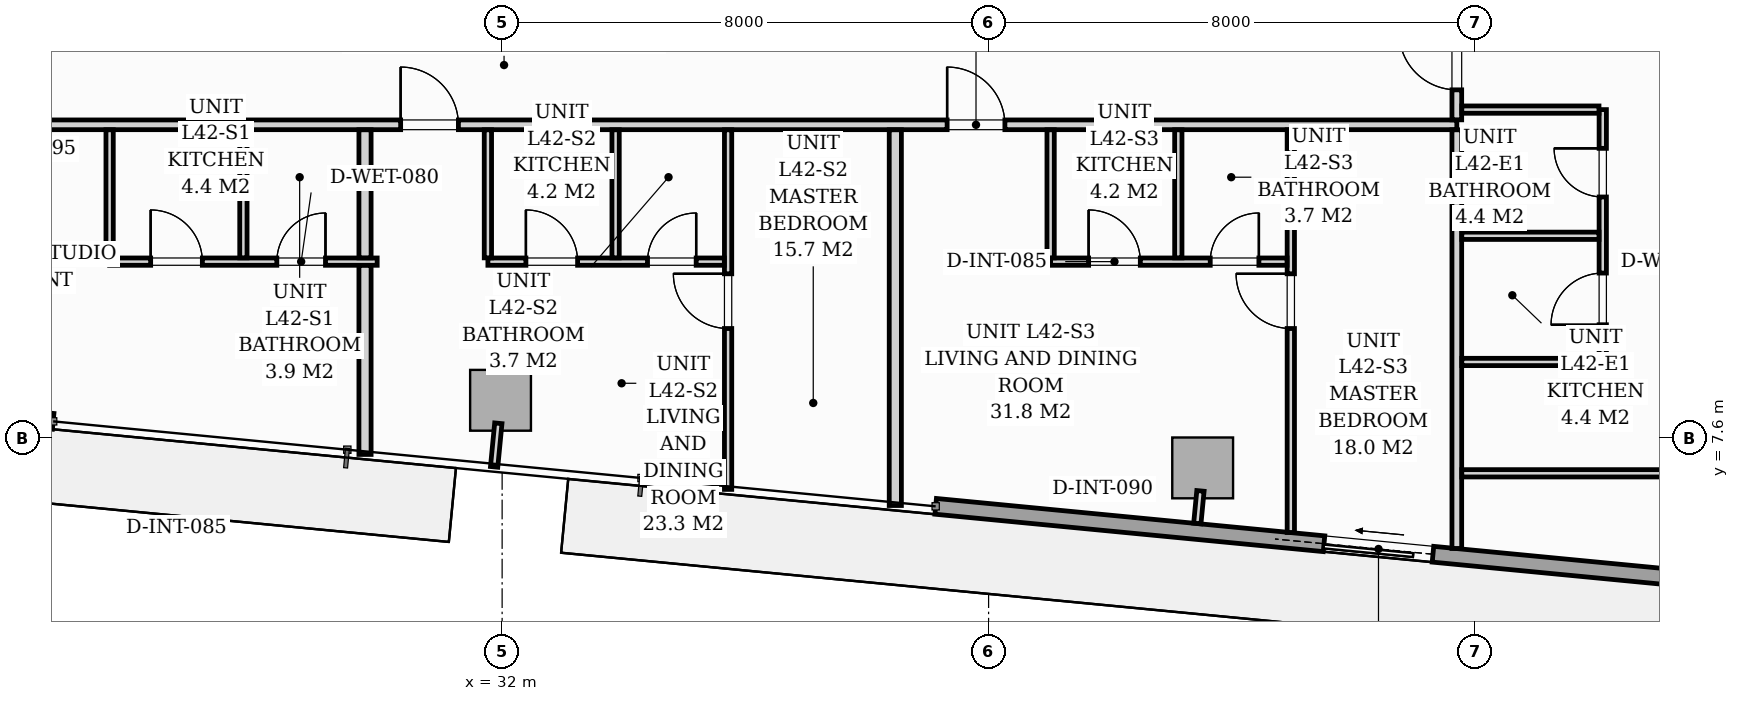
"""IFC4 building model, lengths in metres.
Left out: names, types, materials, properties, quantities, classifications, styles, units other than length and angle.
Written with IfcOpenShell. Run it as: python <this file> out.ifc"""

import sys

from ifc_helpers import new_model, si_unit, direction, frame, frame_2d, origin, origin_2d, place, context, subcontext, project, spatial, rectangle, extrude, source, transform, mapped, element, fill, save


model = new_model("IFC4")
c1 = context("Model", 3, precision=1e-05, world=origin(), true_north=direction((0.0, 1.0)))
c2 = subcontext(c1, "Body", "Model", "MODEL_VIEW")
j1 = project(units=[si_unit("LENGTHUNIT", "METRE"), si_unit("PLANEANGLEUNIT", "RADIAN")], contexts=[c1])
p1 = place(None, origin())
s1 = spatial("IfcSite", under=j1, at=p1, CompositionType="ELEMENT")
p2 = place(p1, origin())
s2 = spatial("IfcBuilding", under=s1, at=p2, CompositionType="ELEMENT")
p3 = place(p2, frame((0.0, 0.0, 147.0)))
s3 = spatial("IfcBuildingStorey", under=s2, at=p3, CompositionType="ELEMENT", Elevation=147.0)
m1 = source(origin(), c2, "Body", "SweptSolid", [
    extrude(rectangle(XDim=1.0, YDim=1.0, at=origin_2d()), origin(), (0.0, 0.0, 1.0), 3.196),
])
for number, where, z_axis, x_axis in (
    (1, (31.974, 8.22, 0.002), (0.0, 0.0, 1.0), (0.995, -0.096, 0.0)),
    (2, (43.521, 7.108, 0.002), (0.0, 0.0, 1.0), (0.995, -0.096, 0.0)),
):
    element("IfcColumn", number, at=place(p3, frame(where, z_axis=z_axis, x_axis=x_axis)), inside=s3, PredefinedType="COLUMN", context=c2, shape_type="MappedRepresentation", body=[
        mapped(m1, transform((0.0, 0.0, 0.0), scale=1.0)),
    ])
p4 = place(p3, frame((56.061, 4.845, 0.0), z_axis=(0.0, 0.0, 1.0), x_axis=(-0.995395976631, 0.095848055311, 0.0)))
e3 = element("IfcWall", 3, at=p4, inside=s3, PredefinedType="STANDARD", context=c2, shape_type="SweptSolid", body=[
    extrude(rectangle(XDim=17.01, YDim=0.26, at=frame_2d((8.505, 0.0))), origin(), (0.0, 0.0, 1.0), 2.94),
])
p5 = place(p4, frame((8.794, 0.0, 0.0)))
e4 = element("IfcOpeningElement", 4, at=p5, cuts=e3, PredefinedType="OPENING", context=c2, shape_type="SweptSolid", body=[
    extrude(rectangle(XDim=1.8, YDim=2.06, at=frame_2d((0.9, 1.03))), frame((0.0, 0.14, 0.0), z_axis=(0.0, -1.0, 0.0), x_axis=(1.0, 0.0, 0.0)), (0.0, 0.0, 1.0), 0.28),
])
p6 = place(p4, frame((2.05, 0.0, 0.65)))
e5 = element("IfcOpeningElement", 5, at=p6, cuts=e3, PredefinedType="OPENING", context=c2, shape_type="SweptSolid", body=[
    extrude(rectangle(XDim=1.6, YDim=1.5, at=frame_2d((0.8, 0.75))), frame((0.0, 0.14, 0.0), z_axis=(0.0, -1.0, 0.0), x_axis=(1.0, 0.0, 0.0)), (0.0, 0.0, 1.0), 0.28),
])
p7 = place(p3, frame((24.617, 7.873, 0.0), z_axis=(0.0, 0.0, 1.0), x_axis=(-0.995395976631, 0.095848055311, 0.0)))
e6 = element("IfcWall", 6, at=p7, inside=s3, PredefinedType="STANDARD", context=c2, shape_type="SweptSolid", body=[
    extrude(rectangle(XDim=17.01, YDim=0.26, at=frame_2d((8.505, 0.0))), origin(), (0.0, 0.0, 1.0), 2.94),
])
p8 = place(p7, frame((6.79, 0.0, 0.0)))
e7 = element("IfcOpeningElement", 7, at=p8, cuts=e6, PredefinedType="OPENING", context=c2, shape_type="SweptSolid", body=[
    extrude(rectangle(XDim=1.8, YDim=2.06, at=frame_2d((0.9, 1.03))), frame((0.0, 0.14, 0.0), z_axis=(0.0, -1.0, 0.0), x_axis=(1.0, 0.0, 0.0)), (0.0, 0.0, 1.0), 0.28),
])
p9 = place(p7, frame((9.25, 0.0, 0.65)))
e8 = element("IfcOpeningElement", 8, at=p9, cuts=e6, PredefinedType="OPENING", context=c2, shape_type="SweptSolid", body=[
    extrude(rectangle(XDim=1.6, YDim=1.5, at=frame_2d((0.8, 0.75))), frame((0.0, 0.14, 0.0), z_axis=(0.0, -1.0, 0.0), x_axis=(1.0, 0.0, 0.0)), (0.0, 0.0, 1.0), 0.28),
])
p10 = place(p3, frame((22.05, 12.75, 0.0), z_axis=(0.0, 0.0, 1.0), x_axis=(1.0, 0.0, 0.0)))
e9 = element("IfcWall", 9, at=p10, inside=s3, PredefinedType="PARTITIONING", context=c2, shape_type="SweptSolid", body=[
    extrude(rectangle(XDim=25.65, YDim=0.16, at=frame_2d((12.825, 0.0))), origin(), (0.0, 0.0, 1.0), 2.94),
])
p11 = place(p10, frame((1.312, 0.0, 0.0)))
e10 = element("IfcOpeningElement", 10, at=p11, cuts=e9, PredefinedType="OPENING", context=c2, shape_type="SweptSolid", body=[
    extrude(rectangle(XDim=0.95, YDim=2.06, at=frame_2d((0.475, 1.03))), frame((0.0, 0.09, 0.0), z_axis=(0.0, -1.0, 0.0), x_axis=(1.0, 0.0, 0.0)), (0.0, 0.0, 1.0), 0.18),
])
p12 = place(p10, frame((8.281, 0.0, 0.0)))
e11 = element("IfcOpeningElement", 11, at=p12, cuts=e9, PredefinedType="OPENING", context=c2, shape_type="SweptSolid", body=[
    extrude(rectangle(XDim=0.95, YDim=2.06, at=frame_2d((0.475, 1.03))), frame((0.0, 0.09, 0.0), z_axis=(0.0, -1.0, 0.0), x_axis=(1.0, 0.0, 0.0)), (0.0, 0.0, 1.0), 0.18),
])
p13 = place(p10, frame((17.268, 0.0, 0.0)))
e12 = element("IfcOpeningElement", 12, at=p13, cuts=e9, PredefinedType="OPENING", context=c2, shape_type="SweptSolid", body=[
    extrude(rectangle(XDim=0.95, YDim=2.06, at=frame_2d((0.475, 1.03))), frame((0.0, 0.09, 0.0), z_axis=(0.0, -1.0, 0.0), x_axis=(1.0, 0.0, 0.0)), (0.0, 0.0, 1.0), 0.18),
])
p14 = place(p3, frame((47.7, 5.783, 0.0), z_axis=(0.0, 0.0, 1.0), x_axis=(0.0, 1.0, 0.0)))
e13 = element("IfcWall", 13, at=p14, inside=s3, PredefinedType="PARTITIONING", context=c2, shape_type="SweptSolid", body=[
    extrude(rectangle(XDim=6.885, YDim=0.16, at=frame_2d((3.442, 0.0))), origin(), (0.0, 0.0, 1.0), 2.94),
])
p15 = place(p3, frame((47.7, 12.832, 0.0), z_axis=(0.0, 0.0, 1.0), x_axis=(0.0, 1.0, 0.0)))
e14 = element("IfcWall", 14, at=p15, inside=s3, PredefinedType="PARTITIONING", context=c2, shape_type="SweptSolid", body=[
    extrude(rectangle(XDim=7.818, YDim=0.16, at=frame_2d((3.909, 0.0))), origin(), (0.0, 0.0, 1.0), 2.94),
])
p16 = place(p15, frame((0.493, 0.0, 0.0)))
e15 = element("IfcOpeningElement", 15, at=p16, cuts=e14, PredefinedType="OPENING", context=c2, shape_type="SweptSolid", body=[
    extrude(rectangle(XDim=0.95, YDim=2.06, at=frame_2d((0.475, 1.03))), frame((0.0, 0.09, 0.0), z_axis=(0.0, -1.0, 0.0), x_axis=(1.0, 0.0, 0.0)), (0.0, 0.0, 1.0), 0.18),
])
p17 = place(p15, frame((5.313, 0.0, 0.0)))
e16 = element("IfcOpeningElement", 16, at=p17, cuts=e14, PredefinedType="OPENING", context=c2, shape_type="SweptSolid", body=[
    extrude(rectangle(XDim=0.95, YDim=2.06, at=frame_2d((0.475, 1.03))), frame((0.0, 0.09, 0.0), z_axis=(0.0, -1.0, 0.0), x_axis=(1.0, 0.0, 0.0)), (0.0, 0.0, 1.0), 0.18),
])
p18 = place(p3, frame((25.545, 10.5, 0.0), z_axis=(0.0, 0.0, 1.0), x_axis=(1.0, 0.0, 0.0)))
e17 = element("IfcWall", 17, at=p18, inside=s3, PredefinedType="PARTITIONING", context=c2, shape_type="SweptSolid", body=[
    extrude(rectangle(XDim=4.4, YDim=0.12, at=frame_2d((2.2, 0.0))), origin(), (0.0, 0.0, 1.0), 2.94),
])
p19 = place(p18, frame((0.675, 0.0, 0.0)))
e18 = element("IfcOpeningElement", 18, at=p19, cuts=e17, PredefinedType="OPENING", context=c2, shape_type="SweptSolid", body=[
    extrude(rectangle(XDim=0.85, YDim=2.05, at=frame_2d((0.425, 1.025))), frame((0.0, 0.07, 0.0), z_axis=(0.0, -1.0, 0.0), x_axis=(1.0, 0.0, 0.0)), (0.0, 0.0, 1.0), 0.14),
])
p20 = place(p18, frame((2.75, 0.0, 0.0)))
e19 = element("IfcOpeningElement", 19, at=p20, cuts=e17, PredefinedType="OPENING", context=c2, shape_type="SweptSolid", body=[
    extrude(rectangle(XDim=0.8, YDim=2.02, at=frame_2d((0.4, 1.01))), frame((0.0, 0.07, 0.0), z_axis=(0.0, -1.0, 0.0), x_axis=(1.0, 0.0, 0.0)), (0.0, 0.0, 1.0), 0.14),
])
for number, where, z_axis, x_axis in (
    (20, (25.545, 10.562, 0.0), (0.0, 0.0, 1.0), (0.0, 1.0, 0.0)),
    (21, (27.745, 10.562, 0.0), (0.0, 0.0, 1.0), (0.0, 1.0, 0.0)),
):
    element("IfcWall", number, at=place(p3, frame(where, z_axis=z_axis, x_axis=x_axis)), inside=s3, PredefinedType="PARTITIONING", context=c2, shape_type="SweptSolid", body=[
        extrude(rectangle(XDim=2.106, YDim=0.12, at=frame_2d((1.053, 0.0))), origin(), (0.0, 0.0, 1.0), 2.94),
    ])
p21 = place(p3, frame((29.745, 7.329, 0.0), z_axis=(0.0, 0.0, 1.0), x_axis=(0.0, 1.0, 0.0)))
e22 = element("IfcWall", 22, at=p21, inside=s3, PredefinedType="PARTITIONING", context=c2, shape_type="SweptSolid", body=[
    extrude(rectangle(XDim=3.109, YDim=0.2, at=frame_2d((1.554, 0.0))), origin(), (0.0, 0.0, 1.0), 2.94),
])
p22 = place(p3, frame((29.745, 10.562, 0.0), z_axis=(0.0, 0.0, 1.0), x_axis=(0.0, 1.0, 0.0)))
e23 = element("IfcWall", 23, at=p22, inside=s3, PredefinedType="PARTITIONING", context=c2, shape_type="SweptSolid", body=[
    extrude(rectangle(XDim=2.106, YDim=0.2, at=frame_2d((1.053, 0.0))), origin(), (0.0, 0.0, 1.0), 2.94),
])
p23 = place(p3, frame((35.716, 6.754, 0.0), z_axis=(0.0, 0.0, 1.0), x_axis=(0.0, 1.0, 0.0)))
e24 = element("IfcWall", 24, at=p23, inside=s3, PredefinedType="PARTITIONING", context=c2, shape_type="SweptSolid", body=[
    extrude(rectangle(XDim=5.914, YDim=0.12, at=frame_2d((2.957, 0.0))), origin(), (0.0, 0.0, 1.0), 2.94),
])
p24 = place(p23, frame((2.646, 0.0, 0.0)))
e25 = element("IfcOpeningElement", 25, at=p24, cuts=e24, PredefinedType="OPENING", context=c2, shape_type="SweptSolid", body=[
    extrude(rectangle(XDim=0.9, YDim=2.05, at=frame_2d((0.45, 1.025))), frame((0.0, 0.07, 0.0), z_axis=(0.0, -1.0, 0.0), x_axis=(1.0, 0.0, 0.0)), (0.0, 0.0, 1.0), 0.14),
])
p25 = place(p3, frame((31.766, 10.5, 0.0), z_axis=(0.0, 0.0, 1.0), x_axis=(1.0, 0.0, 0.0)))
e26 = element("IfcWall", 26, at=p25, inside=s3, PredefinedType="PARTITIONING", context=c2, shape_type="SweptSolid", body=[
    extrude(rectangle(XDim=3.888, YDim=0.12, at=frame_2d((1.944, 0.0))), origin(), (0.0, 0.0, 1.0), 2.94),
])
p26 = place(p25, frame((0.625, 0.0, 0.0)))
e27 = element("IfcOpeningElement", 27, at=p26, cuts=e26, PredefinedType="OPENING", context=c2, shape_type="SweptSolid", body=[
    extrude(rectangle(XDim=0.85, YDim=2.05, at=frame_2d((0.425, 1.025))), frame((0.0, 0.07, 0.0), z_axis=(0.0, -1.0, 0.0), x_axis=(1.0, 0.0, 0.0)), (0.0, 0.0, 1.0), 0.14),
])
p27 = place(p25, frame((2.625, 0.0, 0.0)))
e28 = element("IfcOpeningElement", 28, at=p27, cuts=e26, PredefinedType="OPENING", context=c2, shape_type="SweptSolid", body=[
    extrude(rectangle(XDim=0.8, YDim=2.02, at=frame_2d((0.4, 1.01))), frame((0.0, 0.07, 0.0), z_axis=(0.0, -1.0, 0.0), x_axis=(1.0, 0.0, 0.0)), (0.0, 0.0, 1.0), 0.14),
])
for number, where, z_axis, x_axis in (
    (29, (33.866, 10.562, 0.0), (0.0, 0.0, 1.0), (0.0, 1.0, 0.0)),
    (30, (31.766, 10.562, 0.0), (0.0, 0.0, 1.0), (0.0, 1.0, 0.0)),
):
    element("IfcWall", number, at=place(p3, frame(where, z_axis=z_axis, x_axis=x_axis)), inside=s3, PredefinedType="PARTITIONING", context=c2, shape_type="SweptSolid", body=[
        extrude(rectangle(XDim=2.106, YDim=0.12, at=frame_2d((1.053, 0.0))), origin(), (0.0, 0.0, 1.0), 2.94),
    ])
p28 = place(p3, frame((38.466, 6.49, 0.0), z_axis=(0.0, 0.0, 1.0), x_axis=(0.0, 1.0, 0.0)))
e31 = element("IfcWall", 31, at=p28, inside=s3, PredefinedType="PARTITIONING", context=c2, shape_type="SweptSolid", body=[
    extrude(rectangle(XDim=6.178, YDim=0.2, at=frame_2d((3.089, 0.0))), origin(), (0.0, 0.0, 1.0), 2.94),
])
p29 = place(p3, frame((44.97, 6.046, 0.0), z_axis=(0.0, 0.0, 1.0), x_axis=(0.0, 1.0, 0.0)))
e32 = element("IfcWall", 32, at=p29, inside=s3, PredefinedType="PARTITIONING", context=c2, shape_type="SweptSolid", body=[
    extrude(rectangle(XDim=6.622, YDim=0.12, at=frame_2d((3.311, 0.0))), origin(), (0.0, 0.0, 1.0), 2.94),
])
p30 = place(p29, frame((3.354, 0.0, 0.0)))
e33 = element("IfcOpeningElement", 33, at=p30, cuts=e32, PredefinedType="OPENING", context=c2, shape_type="SweptSolid", body=[
    extrude(rectangle(XDim=0.9, YDim=2.05, at=frame_2d((0.45, 1.025))), frame((0.0, 0.07, 0.0), z_axis=(0.0, -1.0, 0.0), x_axis=(1.0, 0.0, 0.0)), (0.0, 0.0, 1.0), 0.14),
])
p31 = place(p3, frame((41.02, 10.5, 0.0), z_axis=(0.0, 0.0, 1.0), x_axis=(1.0, 0.0, 0.0)))
e34 = element("IfcWall", 34, at=p31, inside=s3, PredefinedType="PARTITIONING", context=c2, shape_type="SweptSolid", body=[
    extrude(rectangle(XDim=3.888, YDim=0.12, at=frame_2d((1.944, 0.0))), origin(), (0.0, 0.0, 1.0), 2.94),
])
p32 = place(p31, frame((0.625, 0.0, 0.0)))
e35 = element("IfcOpeningElement", 35, at=p32, cuts=e34, PredefinedType="OPENING", context=c2, shape_type="SweptSolid", body=[
    extrude(rectangle(XDim=0.85, YDim=2.05, at=frame_2d((0.425, 1.025))), frame((0.0, 0.07, 0.0), z_axis=(0.0, -1.0, 0.0), x_axis=(1.0, 0.0, 0.0)), (0.0, 0.0, 1.0), 0.14),
])
p33 = place(p31, frame((2.625, 0.0, 0.0)))
e36 = element("IfcOpeningElement", 36, at=p33, cuts=e34, PredefinedType="OPENING", context=c2, shape_type="SweptSolid", body=[
    extrude(rectangle(XDim=0.8, YDim=2.02, at=frame_2d((0.4, 1.01))), frame((0.0, 0.07, 0.0), z_axis=(0.0, -1.0, 0.0), x_axis=(1.0, 0.0, 0.0)), (0.0, 0.0, 1.0), 0.14),
])
for number, where, z_axis, x_axis in (
    (37, (43.12, 10.562, 0.0), (0.0, 0.0, 1.0), (0.0, 1.0, 0.0)),
    (38, (41.02, 10.562, 0.0), (0.0, 0.0, 1.0), (0.0, 1.0, 0.0)),
):
    element("IfcWall", number, at=place(p3, frame(where, z_axis=z_axis, x_axis=x_axis)), inside=s3, PredefinedType="PARTITIONING", context=c2, shape_type="SweptSolid", body=[
        extrude(rectangle(XDim=2.106, YDim=0.12, at=frame_2d((1.053, 0.0))), origin(), (0.0, 0.0, 1.0), 2.94),
    ])
p34 = place(p3, frame((50.1, 8.85, 0.0), z_axis=(0.0, 0.0, 1.0), x_axis=(0.0, 1.0, 0.0)))
e39 = element("IfcWall", 39, at=p34, inside=s3, PredefinedType="PARTITIONING", context=c2, shape_type="SweptSolid", body=[
    extrude(rectangle(XDim=4.15, YDim=0.12, at=frame_2d((2.075, 0.0))), origin(), (0.0, 0.0, 1.0), 2.94),
])
p35 = place(p34, frame((0.612, 0.0, 0.0)))
e40 = element("IfcOpeningElement", 40, at=p35, cuts=e39, PredefinedType="OPENING", context=c2, shape_type="SweptSolid", body=[
    extrude(rectangle(XDim=0.85, YDim=2.05, at=frame_2d((0.425, 1.025))), frame((0.0, 0.07, 0.0), z_axis=(0.0, -1.0, 0.0), x_axis=(1.0, 0.0, 0.0)), (0.0, 0.0, 1.0), 0.14),
])
p36 = place(p34, frame((2.713, 0.0, 0.0)))
e41 = element("IfcOpeningElement", 41, at=p36, cuts=e39, PredefinedType="OPENING", context=c2, shape_type="SweptSolid", body=[
    extrude(rectangle(XDim=0.8, YDim=2.02, at=frame_2d((0.4, 1.01))), frame((0.0, 0.07, 0.0), z_axis=(0.0, -1.0, 0.0), x_axis=(1.0, 0.0, 0.0)), (0.0, 0.0, 1.0), 0.14),
])
for number, where, z_axis, x_axis in (
    (42, (47.782, 10.925, 0.0), (0.0, 0.0, 1.0), (1.0, 0.0, 0.0)),
    (43, (47.782, 8.85, 0.0), (0.0, 0.0, 1.0), (1.0, 0.0, 0.0)),
    (44, (47.782, 13.0, 0.0), (0.0, 0.0, 1.0), (1.0, 0.0, 0.0)),
):
    element("IfcWall", number, at=place(p3, frame(where, z_axis=z_axis, x_axis=x_axis)), inside=s3, PredefinedType="PARTITIONING", context=c2, shape_type="SweptSolid", body=[
        extrude(rectangle(XDim=2.256, YDim=0.12, at=frame_2d((1.128, 0.0))), origin(), (0.0, 0.0, 1.0), 2.94),
    ])
p37 = place(p3, frame((47.782, 7.019, 0.0), z_axis=(0.0, 0.0, 1.0), x_axis=(1.0, 0.0, 0.0)))
e45 = element("IfcWall", 45, at=p37, inside=s3, PredefinedType="PARTITIONING", context=c2, shape_type="SweptSolid", body=[
    extrude(rectangle(XDim=8.682, YDim=0.12, at=frame_2d((4.341, 0.0))), origin(), (0.0, 0.0, 1.0), 2.94),
])
p38 = place(p37, frame((3.916, 0.0, 0.0)))
e46 = element("IfcOpeningElement", 46, at=p38, cuts=e45, PredefinedType="OPENING", context=c2, shape_type="SweptSolid", body=[
    extrude(rectangle(XDim=0.85, YDim=2.05, at=frame_2d((0.425, 1.025))), frame((0.0, 0.07, 0.0), z_axis=(0.0, -1.0, 0.0), x_axis=(1.0, 0.0, 0.0)), (0.0, 0.0, 1.0), 0.14),
])
p39 = place(p3, frame((31.938, 7.841, 0.0), z_axis=(0.0, 0.0, 1.0), x_axis=(-0.095977354523, -0.995383517755, 0.0)))
e47 = element("IfcWall", 47, at=p39, inside=s3, PredefinedType="PARTITIONING", context=c2, shape_type="SweptSolid", body=[
    extrude(rectangle(XDim=0.72, YDim=0.12, at=frame_2d((0.36, 0.0))), origin(), (0.0, 0.0, 1.0), 2.94),
])
p40 = place(p3, frame((43.484, 6.729, 0.0), z_axis=(0.0, 0.0, 1.0), x_axis=(-0.095772948675, -0.995403205893, 0.0)))
e48 = element("IfcWall", 48, at=p40, inside=s3, PredefinedType="PARTITIONING", context=c2, shape_type="SweptSolid", body=[
    extrude(rectangle(XDim=0.538, YDim=0.12, at=frame_2d((0.269, 0.0))), origin(), (0.0, 0.0, 1.0), 2.94),
])
m2 = source(origin(), c2, "Body", "SweptSolid", [
    extrude(rectangle(XDim=1.8, YDim=2.06, at=frame_2d((0.9, 1.03))), frame((0.0, 0.025, 0.0), z_axis=(0.0, -1.0, 0.0), x_axis=(1.0, 0.0, 0.0)), (0.0, 0.0, 1.0), 0.05),
])
p41 = place(p5, origin())
e49 = element("IfcDoor", 49, at=p41, inside=s3, OperationType="SLIDING_TO_RIGHT", PredefinedType="DOOR", context=c2, shape_type="MappedRepresentation", body=[
    mapped(m2, transform((0.0, 0.0, 0.0), scale=1.0)),
])
fill(e4, e49)
m3 = source(origin(), c2, "Body", "SweptSolid", [
    extrude(rectangle(XDim=0.85, YDim=2.05, at=frame_2d((0.425, 1.025))), frame((0.0, 0.025, 0.0), z_axis=(0.0, -1.0, 0.0), x_axis=(1.0, 0.0, 0.0)), (0.0, 0.0, 1.0), 0.05),
])
p42 = place(p19, origin())
e50 = element("IfcDoor", 50, at=p42, inside=s3, OperationType="SINGLE_SWING_LEFT", PredefinedType="DOOR", context=c2, shape_type="MappedRepresentation", body=[
    mapped(m3, transform((0.0, 0.0, 0.0), scale=1.0)),
])
fill(e18, e50)
m4 = source(origin(), c2, "Body", "SweptSolid", [
    extrude(rectangle(XDim=0.8, YDim=2.02, at=frame_2d((0.4, 1.01))), frame((0.0, 0.025, 0.0), z_axis=(0.0, -1.0, 0.0), x_axis=(1.0, 0.0, 0.0)), (0.0, 0.0, 1.0), 0.05),
])
p43 = place(p20, origin())
e51 = element("IfcDoor", 51, at=p43, inside=s3, OperationType="SINGLE_SWING_RIGHT", PredefinedType="DOOR", context=c2, shape_type="MappedRepresentation", body=[
    mapped(m4, transform((0.0, 0.0, 0.0), scale=1.0)),
])
fill(e19, e51)
m5 = source(origin(), c2, "Body", "SweptSolid", [
    extrude(rectangle(XDim=0.95, YDim=2.06, at=frame_2d((0.475, 1.03))), frame((0.0, 0.025, 0.0), z_axis=(0.0, -1.0, 0.0), x_axis=(1.0, 0.0, 0.0)), (0.0, 0.0, 1.0), 0.05),
])
p44 = place(p12, origin())
e52 = element("IfcDoor", 52, at=p44, inside=s3, OperationType="SINGLE_SWING_LEFT", PredefinedType="DOOR", context=c2, shape_type="MappedRepresentation", body=[
    mapped(m5, transform((0.0, 0.0, 0.0), scale=1.0)),
])
fill(e11, e52)
m6 = source(origin(), c2, "Body", "SweptSolid", [
    extrude(rectangle(XDim=0.9, YDim=2.05, at=frame_2d((0.45, 1.025))), frame((0.0, 0.025, 0.0), z_axis=(0.0, -1.0, 0.0), x_axis=(1.0, 0.0, 0.0)), (0.0, 0.0, 1.0), 0.05),
])
p45 = place(p24, origin())
e53 = element("IfcDoor", 53, at=p45, inside=s3, OperationType="SINGLE_SWING_RIGHT", PredefinedType="DOOR", context=c2, shape_type="MappedRepresentation", body=[
    mapped(m6, transform((0.0, 0.0, 0.0), scale=1.0)),
])
fill(e25, e53)
p46 = place(p26, origin())
e54 = element("IfcDoor", 54, at=p46, inside=s3, OperationType="SINGLE_SWING_LEFT", PredefinedType="DOOR", context=c2, shape_type="MappedRepresentation", body=[
    mapped(m3, transform((0.0, 0.0, 0.0), scale=1.0)),
])
fill(e27, e54)
p47 = place(p27, origin())
e55 = element("IfcDoor", 55, at=p47, inside=s3, OperationType="SINGLE_SWING_RIGHT", PredefinedType="DOOR", context=c2, shape_type="MappedRepresentation", body=[
    mapped(m4, transform((0.0, 0.0, 0.0), scale=1.0)),
])
fill(e28, e55)
p48 = place(p13, origin())
e56 = element("IfcDoor", 56, at=p48, inside=s3, OperationType="SINGLE_SWING_LEFT", PredefinedType="DOOR", context=c2, shape_type="MappedRepresentation", body=[
    mapped(m5, transform((0.0, 0.0, 0.0), scale=1.0)),
])
fill(e12, e56)
p49 = place(p30, origin())
e57 = element("IfcDoor", 57, at=p49, inside=s3, OperationType="SINGLE_SWING_RIGHT", PredefinedType="DOOR", context=c2, shape_type="MappedRepresentation", body=[
    mapped(m6, transform((0.0, 0.0, 0.0), scale=1.0)),
])
fill(e33, e57)
p50 = place(p32, origin())
e58 = element("IfcDoor", 58, at=p50, inside=s3, OperationType="SINGLE_SWING_LEFT", PredefinedType="DOOR", context=c2, shape_type="MappedRepresentation", body=[
    mapped(m3, transform((0.0, 0.0, 0.0), scale=1.0)),
])
fill(e35, e58)
p51 = place(p33, origin())
e59 = element("IfcDoor", 59, at=p51, inside=s3, OperationType="SINGLE_SWING_RIGHT", PredefinedType="DOOR", context=c2, shape_type="MappedRepresentation", body=[
    mapped(m4, transform((0.0, 0.0, 0.0), scale=1.0)),
])
fill(e36, e59)
p52 = place(p16, origin())
e60 = element("IfcDoor", 60, at=p52, inside=s3, OperationType="SINGLE_SWING_RIGHT", PredefinedType="DOOR", context=c2, shape_type="MappedRepresentation", body=[
    mapped(m5, transform((0.0, 0.0, 0.0), scale=1.0)),
])
fill(e15, e60)
p53 = place(p35, origin())
e61 = element("IfcDoor", 61, at=p53, inside=s3, OperationType="SINGLE_SWING_LEFT", PredefinedType="DOOR", context=c2, shape_type="MappedRepresentation", body=[
    mapped(m3, transform((0.0, 0.0, 0.0), scale=1.0)),
])
fill(e40, e61)
p54 = place(p36, origin())
e62 = element("IfcDoor", 62, at=p54, inside=s3, OperationType="SINGLE_SWING_RIGHT", PredefinedType="DOOR", context=c2, shape_type="MappedRepresentation", body=[
    mapped(m4, transform((0.0, 0.0, 0.0), scale=1.0)),
])
fill(e41, e62)
save(model, sys.argv[1])
